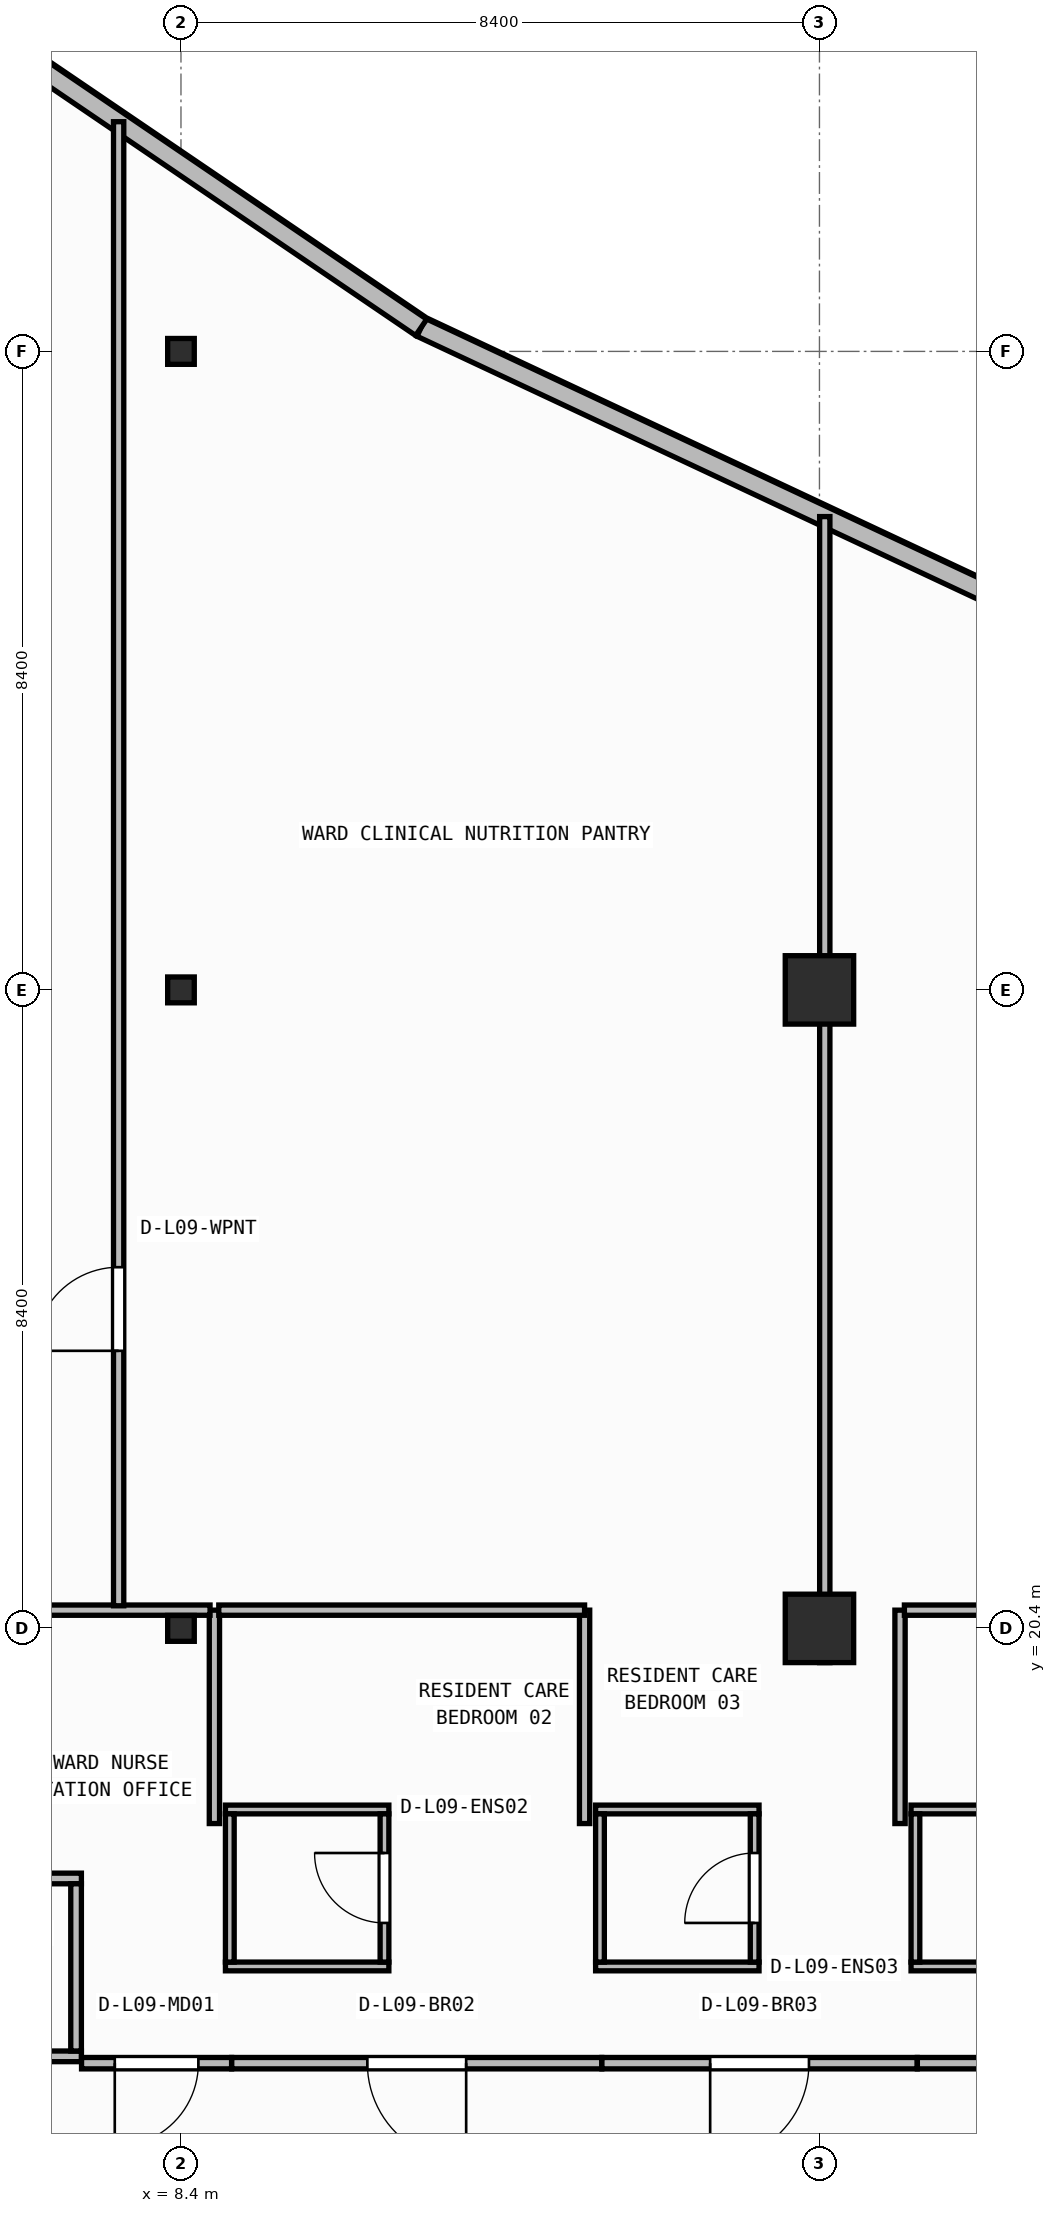
"""IFC4 building model, lengths in metres.
Left out: names, types, materials, properties, quantities, classifications, styles, units other than length and angle.
Written with IfcOpenShell. Run it as: python <this file> out.ifc"""

import sys

from ifc_helpers import new_model, si_unit, direction, frame, frame_2d, origin, origin_2d, place, context, subcontext, project, spatial, rectangle, i_section, extrude, element, fill, save


model = new_model("IFC4")
c1 = context("Model", 3, precision=1e-05, world=origin(), true_north=direction((0.0, 1.0)))
c2 = subcontext(c1, "Body", "Model", "MODEL_VIEW")
j1 = project(units=[si_unit("LENGTHUNIT", "METRE"), si_unit("PLANEANGLEUNIT", "RADIAN")], contexts=[c1])
p1 = place(None, origin())
s1 = spatial("IfcSite", under=j1, at=p1, CompositionType="ELEMENT")
p2 = place(p1, origin())
s2 = spatial("IfcBuilding", under=s1, at=p2, CompositionType="ELEMENT")
p3 = place(p2, frame((0.0, 0.0, 38.3)))
s3 = spatial("IfcBuildingStorey", under=s2, at=p3, CompositionType="ELEMENT", Elevation=38.3)
p4 = place(p3, frame((8.4, 20.4, 0.0), z_axis=(0.0, 0.0, 1.0), x_axis=(1.0, 0.0, 0.0)))
e1 = element("IfcColumn", 1, at=p4, inside=s3, PredefinedType="COLUMN", context=c2, shape_type="SweptSolid", body=[
    extrude(i_section(OverallWidth=0.35, OverallDepth=0.34, WebThickness=0.016, FlangeThickness=0.028, at=origin_2d()), origin(), (0.0, 0.0, 1.0), 3.95),
])
p5 = place(p3, frame((16.8, 20.4, 0.0), z_axis=(0.0, 0.0, 1.0), x_axis=(1.0, 0.0, 0.0)))
e2 = element("IfcColumn", 2, at=p5, inside=s3, PredefinedType="COLUMN", context=c2, shape_type="SweptSolid", body=[
    extrude(rectangle(XDim=0.9, YDim=0.9, at=origin_2d()), origin(), (0.0, 0.0, 1.0), 3.95),
])
p6 = place(p3, frame((8.4, 28.8, 0.0), z_axis=(0.0, 0.0, 1.0), x_axis=(1.0, 0.0, 0.0)))
e3 = element("IfcColumn", 3, at=p6, inside=s3, PredefinedType="COLUMN", context=c2, shape_type="SweptSolid", body=[
    extrude(i_section(OverallWidth=0.35, OverallDepth=0.34, WebThickness=0.016, FlangeThickness=0.028, at=origin_2d()), origin(), (0.0, 0.0, 1.0), 3.95),
])
p7 = place(p3, frame((16.8, 28.8, 0.0), z_axis=(0.0, 0.0, 1.0), x_axis=(1.0, 0.0, 0.0)))
e4 = element("IfcColumn", 4, at=p7, inside=s3, PredefinedType="COLUMN", context=c2, shape_type="SweptSolid", body=[
    extrude(rectangle(XDim=0.9, YDim=0.9, at=origin_2d()), origin(), (0.0, 0.0, 1.0), 3.95),
])
p8 = place(p3, frame((8.4, 37.2, 0.0), z_axis=(0.0, 0.0, 1.0), x_axis=(1.0, 0.0, 0.0)))
e5 = element("IfcColumn", 5, at=p8, inside=s3, PredefinedType="COLUMN", context=c2, shape_type="SweptSolid", body=[
    extrude(i_section(OverallWidth=0.35, OverallDepth=0.34, WebThickness=0.016, FlangeThickness=0.028, at=origin_2d()), origin(), (0.0, 0.0, 1.0), 3.95),
])
p9 = place(p3, frame((24.408, 31.492, 0.0), z_axis=(0.0, 0.0, 1.0), x_axis=(-0.905396522918, 0.424566998585, 0.0)))
e6 = element("IfcWall", 6, at=p9, inside=s3, PredefinedType="STANDARD", context=c2, shape_type="SweptSolid", body=[
    extrude(rectangle(XDim=14.189, YDim=0.26, at=frame_2d((7.095, 0.0))), origin(), (0.0, 0.0, 1.0), 3.71),
])
p10 = place(p9, frame((2.953, 0.0, 0.9)))
e7 = element("IfcOpeningElement", 7, at=p10, cuts=e6, PredefinedType="OPENING", context=c2, shape_type="SweptSolid", body=[
    extrude(rectangle(XDim=2.4, YDim=1.65, at=frame_2d((1.2, 0.825))), frame((0.0, 0.14, 0.0), z_axis=(0.0, -1.0, 0.0), x_axis=(1.0, 0.0, 0.0)), (0.0, 0.0, 1.0), 0.28),
])
p11 = place(p3, frame((11.561, 37.517, 0.0), z_axis=(0.0, 0.0, 1.0), x_axis=(-0.827064743936, 0.562106670782, 0.0)))
e8 = element("IfcWall", 8, at=p11, inside=s3, PredefinedType="STANDARD", context=c2, shape_type="SweptSolid", body=[
    extrude(rectangle(XDim=10.641, YDim=0.26, at=frame_2d((5.32, 0.0))), origin(), (0.0, 0.0, 1.0), 3.71),
])
p12 = place(p11, frame((6.537, 0.0, 0.9)))
e9 = element("IfcOpeningElement", 9, at=p12, cuts=e8, PredefinedType="OPENING", context=c2, shape_type="SweptSolid", body=[
    extrude(rectangle(XDim=2.4, YDim=1.65, at=frame_2d((1.2, 0.825))), frame((0.0, 0.14, 0.0), z_axis=(0.0, -1.0, 0.0), x_axis=(1.0, 0.0, 0.0)), (0.0, 0.0, 1.0), 0.28),
])
p13 = place(p3, frame((4.31, 14.77, 0.0), z_axis=(0.0, 0.0, 1.0), x_axis=(1.0, 0.0, 0.0)))
e10 = element("IfcWall", 10, at=p13, inside=s3, PredefinedType="PARTITIONING", context=c2, shape_type="SweptSolid", body=[
    extrude(rectangle(XDim=2.78, YDim=0.14, at=frame_2d((1.39, 0.0))), origin(), (0.0, 0.0, 1.0), 3.71),
])
p14 = place(p13, frame((0.9, 0.0, 0.0)))
e11 = element("IfcOpeningElement", 11, at=p14, cuts=e10, PredefinedType="OPENING", context=c2, shape_type="SweptSolid", body=[
    extrude(rectangle(XDim=0.98, YDim=2.1, at=frame_2d((0.49, 1.05))), frame((0.0, 0.08, 0.0), z_axis=(0.0, -1.0, 0.0), x_axis=(1.0, 0.0, 0.0)), (0.0, 0.0, 1.0), 0.16),
])
p15 = place(p3, frame((4.31, 17.11, 0.0), z_axis=(0.0, 0.0, 1.0), x_axis=(1.0, 0.0, 0.0)))
e12 = element("IfcWall", 12, at=p15, inside=s3, PredefinedType="PARTITIONING", context=c2, shape_type="SweptSolid", body=[
    extrude(rectangle(XDim=2.78, YDim=0.14, at=frame_2d((1.39, 0.0))), origin(), (0.0, 0.0, 1.0), 3.71),
])
p16 = place(p3, frame((7.02, 14.84, 0.0), z_axis=(0.0, 0.0, 1.0), x_axis=(0.0, 1.0, 0.0)))
e13 = element("IfcWall", 13, at=p16, inside=s3, PredefinedType="PARTITIONING", context=c2, shape_type="SweptSolid", body=[
    extrude(rectangle(XDim=2.2, YDim=0.14, at=frame_2d((1.1, 0.0))), origin(), (0.0, 0.0, 1.0), 3.71),
])
for number, where, z_axis, x_axis in (
    (14, (8.985, 15.952, 0.0), (0.0, 0.0, 1.0), (1.0, 0.0, 0.0)),
    (15, (8.985, 18.018, 0.0), (0.0, 0.0, 1.0), (1.0, 0.0, 0.0)),
):
    element("IfcWall", number, at=place(p3, frame(where, z_axis=z_axis, x_axis=x_axis)), inside=s3, PredefinedType="PARTITIONING", context=c2, shape_type="SweptSolid", body=[
        extrude(rectangle(XDim=2.15, YDim=0.115, at=frame_2d((1.075, 0.0))), origin(), (0.0, 0.0, 1.0), 3.71),
    ])
p17 = place(p3, frame((9.042, 16.01, 0.0), z_axis=(0.0, 0.0, 1.0), x_axis=(0.0, 1.0, 0.0)))
e16 = element("IfcWall", 16, at=p17, inside=s3, PredefinedType="PARTITIONING", context=c2, shape_type="SweptSolid", body=[
    extrude(rectangle(XDim=1.95, YDim=0.115, at=frame_2d((0.975, 0.0))), origin(), (0.0, 0.0, 1.0), 3.71),
])
p18 = place(p3, frame((11.077, 16.01, 0.0), z_axis=(0.0, 0.0, 1.0), x_axis=(0.0, 1.0, 0.0)))
e17 = element("IfcWall", 17, at=p18, inside=s3, PredefinedType="PARTITIONING", context=c2, shape_type="SweptSolid", body=[
    extrude(rectangle(XDim=1.95, YDim=0.115, at=frame_2d((0.975, 0.0))), origin(), (0.0, 0.0, 1.0), 3.71),
])
p19 = place(p18, frame((0.515, 0.0, 0.0)))
e18 = element("IfcOpeningElement", 18, at=p19, cuts=e17, PredefinedType="OPENING", context=c2, shape_type="SweptSolid", body=[
    extrude(rectangle(XDim=0.92, YDim=2.1, at=frame_2d((0.46, 1.05))), frame((0.0, 0.067, 0.0), z_axis=(0.0, -1.0, 0.0), x_axis=(1.0, 0.0, 0.0)), (0.0, 0.0, 1.0), 0.135),
])
for number, where, z_axis, x_axis in (
    (19, (13.855, 15.952, 0.0), (0.0, 0.0, 1.0), (1.0, 0.0, 0.0)),
    (20, (13.855, 18.018, 0.0), (0.0, 0.0, 1.0), (1.0, 0.0, 0.0)),
):
    element("IfcWall", number, at=place(p3, frame(where, z_axis=z_axis, x_axis=x_axis)), inside=s3, PredefinedType="PARTITIONING", context=c2, shape_type="SweptSolid", body=[
        extrude(rectangle(XDim=2.15, YDim=0.115, at=frame_2d((1.075, 0.0))), origin(), (0.0, 0.0, 1.0), 3.71),
    ])
p20 = place(p3, frame((13.913, 16.01, 0.0), z_axis=(0.0, 0.0, 1.0), x_axis=(0.0, 1.0, 0.0)))
e21 = element("IfcWall", 21, at=p20, inside=s3, PredefinedType="PARTITIONING", context=c2, shape_type="SweptSolid", body=[
    extrude(rectangle(XDim=1.95, YDim=0.115, at=frame_2d((0.975, 0.0))), origin(), (0.0, 0.0, 1.0), 3.71),
])
p21 = place(p3, frame((15.948, 16.01, 0.0), z_axis=(0.0, 0.0, 1.0), x_axis=(0.0, 1.0, 0.0)))
e22 = element("IfcWall", 22, at=p21, inside=s3, PredefinedType="PARTITIONING", context=c2, shape_type="SweptSolid", body=[
    extrude(rectangle(XDim=1.95, YDim=0.115, at=frame_2d((0.975, 0.0))), origin(), (0.0, 0.0, 1.0), 3.71),
])
p22 = place(p21, frame((0.515, 0.0, 0.0)))
e23 = element("IfcOpeningElement", 23, at=p22, cuts=e22, PredefinedType="OPENING", context=c2, shape_type="SweptSolid", body=[
    extrude(rectangle(XDim=0.92, YDim=2.1, at=frame_2d((0.46, 1.05))), frame((0.0, 0.067, 0.0), z_axis=(0.0, -1.0, 0.0), x_axis=(1.0, 0.0, 0.0)), (0.0, 0.0, 1.0), 0.135),
])
for number, where, z_axis, x_axis in (
    (24, (18.005, 15.952, 0.0), (0.0, 0.0, 1.0), (1.0, 0.0, 0.0)),
    (25, (18.005, 18.018, 0.0), (0.0, 0.0, 1.0), (1.0, 0.0, 0.0)),
):
    element("IfcWall", number, at=place(p3, frame(where, z_axis=z_axis, x_axis=x_axis)), inside=s3, PredefinedType="PARTITIONING", context=c2, shape_type="SweptSolid", body=[
        extrude(rectangle(XDim=2.15, YDim=0.115, at=frame_2d((1.075, 0.0))), origin(), (0.0, 0.0, 1.0), 3.71),
    ])
p23 = place(p3, frame((18.062, 16.01, 0.0), z_axis=(0.0, 0.0, 1.0), x_axis=(0.0, 1.0, 0.0)))
e26 = element("IfcWall", 26, at=p23, inside=s3, PredefinedType="PARTITIONING", context=c2, shape_type="SweptSolid", body=[
    extrude(rectangle(XDim=1.95, YDim=0.115, at=frame_2d((0.975, 0.0))), origin(), (0.0, 0.0, 1.0), 3.71),
])
p24 = place(p3, frame((9.066, 14.68, 0.0), z_axis=(0.0, 0.0, 1.0), x_axis=(-1.0, 0.0, 0.0)))
e27 = element("IfcWall", 27, at=p24, inside=s3, PredefinedType="PARTITIONING", context=c2, shape_type="SweptSolid", body=[
    extrude(rectangle(XDim=1.974, YDim=0.15, at=frame_2d((0.987, 0.0))), origin(), (0.0, 0.0, 1.0), 3.71),
])
p25 = place(p24, frame((0.437, 0.0, 0.0)))
e28 = element("IfcOpeningElement", 28, at=p25, cuts=e27, PredefinedType="OPENING", context=c2, shape_type="SweptSolid", body=[
    extrude(rectangle(XDim=1.1, YDim=2.1, at=frame_2d((0.55, 1.05))), frame((0.0, 0.085, 0.0), z_axis=(0.0, -1.0, 0.0), x_axis=(1.0, 0.0, 0.0)), (0.0, 0.0, 1.0), 0.17),
])
p26 = place(p3, frame((13.936, 14.68, 0.0), z_axis=(0.0, 0.0, 1.0), x_axis=(-1.0, 0.0, 0.0)))
e29 = element("IfcWall", 29, at=p26, inside=s3, PredefinedType="PARTITIONING", context=c2, shape_type="SweptSolid", body=[
    extrude(rectangle(XDim=4.868, YDim=0.15, at=frame_2d((2.434, 0.0))), origin(), (0.0, 0.0, 1.0), 3.71),
])
p27 = place(p26, frame((1.784, 0.0, 0.0)))
e30 = element("IfcOpeningElement", 30, at=p27, cuts=e29, PredefinedType="OPENING", context=c2, shape_type="SweptSolid", body=[
    extrude(rectangle(XDim=1.3, YDim=2.15, at=frame_2d((0.65, 1.075))), frame((0.0, 0.085, 0.0), z_axis=(0.0, -1.0, 0.0), x_axis=(1.0, 0.0, 0.0)), (0.0, 0.0, 1.0), 0.17),
])
p28 = place(p3, frame((18.086, 14.68, 0.0), z_axis=(0.0, 0.0, 1.0), x_axis=(-1.0, 0.0, 0.0)))
e31 = element("IfcWall", 31, at=p28, inside=s3, PredefinedType="PARTITIONING", context=c2, shape_type="SweptSolid", body=[
    extrude(rectangle(XDim=4.148, YDim=0.15, at=frame_2d((2.074, 0.0))), origin(), (0.0, 0.0, 1.0), 3.71),
])
p29 = place(p28, frame((1.424, 0.0, 0.0)))
e32 = element("IfcOpeningElement", 32, at=p29, cuts=e31, PredefinedType="OPENING", context=c2, shape_type="SweptSolid", body=[
    extrude(rectangle(XDim=1.3, YDim=2.15, at=frame_2d((0.65, 1.075))), frame((0.0, 0.085, 0.0), z_axis=(0.0, -1.0, 0.0), x_axis=(1.0, 0.0, 0.0)), (0.0, 0.0, 1.0), 0.17),
])
p30 = place(p3, frame((22.596, 14.68, 0.0), z_axis=(0.0, 0.0, 1.0), x_axis=(-1.0, 0.0, 0.0)))
e33 = element("IfcWall", 33, at=p30, inside=s3, PredefinedType="PARTITIONING", context=c2, shape_type="SweptSolid", body=[
    extrude(rectangle(XDim=4.508, YDim=0.15, at=frame_2d((2.254, 0.0))), origin(), (0.0, 0.0, 1.0), 3.71),
])
p31 = place(p30, frame((1.604, 0.0, 0.0)))
e34 = element("IfcOpeningElement", 34, at=p31, cuts=e33, PredefinedType="OPENING", context=c2, shape_type="SweptSolid", body=[
    extrude(rectangle(XDim=1.3, YDim=2.15, at=frame_2d((0.65, 1.075))), frame((0.0, 0.085, 0.0), z_axis=(0.0, -1.0, 0.0), x_axis=(1.0, 0.0, 0.0)), (0.0, 0.0, 1.0), 0.17),
])
p32 = place(p3, frame((8.84, 17.833, 0.0), z_axis=(0.0, 0.0, 1.0), x_axis=(0.0, 1.0, 0.0)))
e35 = element("IfcWall", 35, at=p32, inside=s3, PredefinedType="PARTITIONING", context=c2, shape_type="SweptSolid", body=[
    extrude(rectangle(XDim=2.807, YDim=0.135, at=frame_2d((1.404, 0.0))), origin(), (0.0, 0.0, 1.0), 3.71),
])
p33 = place(p3, frame((8.782, 20.64, 0.0), z_axis=(0.0, 0.0, 1.0), x_axis=(-1.0, 0.0, 0.0)))
e36 = element("IfcWall", 36, at=p33, inside=s3, PredefinedType="PARTITIONING", context=c2, shape_type="SweptSolid", body=[
    extrude(rectangle(XDim=4.395, YDim=0.135, at=frame_2d((2.198, 0.0))), origin(), (0.0, 0.0, 1.0), 3.073),
])
p34 = place(p33, frame((3.023, 0.0, 0.0)))
e37 = element("IfcOpeningElement", 37, at=p34, cuts=e36, PredefinedType="OPENING", context=c2, shape_type="SweptSolid", body=[
    extrude(rectangle(XDim=1.1, YDim=2.1, at=frame_2d((0.55, 1.05))), frame((0.0, 0.077, 0.0), z_axis=(0.0, -1.0, 0.0), x_axis=(1.0, 0.0, 0.0)), (0.0, 0.0, 1.0), 0.155),
])
p35 = place(p3, frame((13.71, 17.833, 0.0), z_axis=(0.0, 0.0, 1.0), x_axis=(0.0, 1.0, 0.0)))
e38 = element("IfcWall", 38, at=p35, inside=s3, PredefinedType="PARTITIONING", context=c2, shape_type="SweptSolid", body=[
    extrude(rectangle(XDim=2.807, YDim=0.135, at=frame_2d((1.404, 0.0))), origin(), (0.0, 0.0, 1.0), 3.71),
])
p36 = place(p3, frame((13.71, 20.64, 0.0), z_axis=(0.0, 0.0, 1.0), x_axis=(-1.0, 0.0, 0.0)))
e39 = element("IfcWall", 39, at=p36, inside=s3, PredefinedType="PARTITIONING", context=c2, shape_type="SweptSolid", body=[
    extrude(rectangle(XDim=4.812, YDim=0.135, at=frame_2d((2.406, 0.0))), origin(), (0.0, 0.0, 1.0), 3.073),
])
p37 = place(p3, frame((17.86, 17.833, 0.0), z_axis=(0.0, 0.0, 1.0), x_axis=(0.0, 1.0, 0.0)))
e40 = element("IfcWall", 40, at=p37, inside=s3, PredefinedType="PARTITIONING", context=c2, shape_type="SweptSolid", body=[
    extrude(rectangle(XDim=2.807, YDim=0.135, at=frame_2d((1.404, 0.0))), origin(), (0.0, 0.0, 1.0), 3.71),
])
p38 = place(p3, frame((22.37, 20.64, 0.0), z_axis=(0.0, 0.0, 1.0), x_axis=(-1.0, 0.0, 0.0)))
e41 = element("IfcWall", 41, at=p38, inside=s3, PredefinedType="PARTITIONING", context=c2, shape_type="SweptSolid", body=[
    extrude(rectangle(XDim=4.453, YDim=0.135, at=frame_2d((2.226, 0.0))), origin(), (0.0, 0.0, 1.0), 3.073),
])
p39 = place(p3, frame((7.58, 20.698, 0.0), z_axis=(0.0, 0.0, 1.0), x_axis=(0.0, 1.0, 0.0)))
e42 = element("IfcWall", 42, at=p39, inside=s3, PredefinedType="PARTITIONING", context=c2, shape_type="SweptSolid", body=[
    extrude(rectangle(XDim=19.524, YDim=0.135, at=frame_2d((9.762, 0.0))), origin(), (0.0, 0.0, 1.0), 3.71),
])
p40 = place(p39, frame((3.354, 0.0, 0.0)))
e43 = element("IfcOpeningElement", 43, at=p40, cuts=e42, PredefinedType="OPENING", context=c2, shape_type="SweptSolid", body=[
    extrude(rectangle(XDim=1.1, YDim=2.1, at=frame_2d((0.55, 1.05))), frame((0.0, 0.077, 0.0), z_axis=(0.0, -1.0, 0.0), x_axis=(1.0, 0.0, 0.0)), (0.0, 0.0, 1.0), 0.155),
])
p41 = place(p3, frame((16.87, 19.95, 0.0), z_axis=(0.0, 0.0, 1.0), x_axis=(0.0, 1.0, 0.0)))
e44 = element("IfcWall", 44, at=p41, inside=s3, PredefinedType="PARTITIONING", context=c2, shape_type="SweptSolid", body=[
    extrude(rectangle(XDim=15.077, YDim=0.135, at=frame_2d((7.539, 0.0))), origin(), (0.0, 0.0, 1.0), 3.073),
])
p42 = place(p19, origin())
e45 = element("IfcDoor", 45, at=p42, inside=s3, OperationType="SINGLE_SWING_RIGHT", PredefinedType="DOOR", context=c2, shape_type="SweptSolid", body=[
    extrude(rectangle(XDim=0.92, YDim=2.1, at=frame_2d((0.46, 1.05))), frame((0.0, 0.025, 0.0), z_axis=(0.0, -1.0, 0.0), x_axis=(1.0, 0.0, 0.0)), (0.0, 0.0, 1.0), 0.05),
])
fill(e18, e45)
p43 = place(p22, origin())
e46 = element("IfcDoor", 46, at=p43, inside=s3, OperationType="SINGLE_SWING_LEFT", PredefinedType="DOOR", context=c2, shape_type="SweptSolid", body=[
    extrude(rectangle(XDim=0.92, YDim=2.1, at=frame_2d((0.46, 1.05))), frame((0.0, 0.025, 0.0), z_axis=(0.0, -1.0, 0.0), x_axis=(1.0, 0.0, 0.0)), (0.0, 0.0, 1.0), 0.05),
])
fill(e23, e46)
p44 = place(p25, origin())
e47 = element("IfcDoor", 47, at=p44, inside=s3, OperationType="SINGLE_SWING_RIGHT", PredefinedType="DOOR", context=c2, shape_type="SweptSolid", body=[
    extrude(rectangle(XDim=1.1, YDim=2.1, at=frame_2d((0.55, 1.05))), frame((0.0, 0.025, 0.0), z_axis=(0.0, -1.0, 0.0), x_axis=(1.0, 0.0, 0.0)), (0.0, 0.0, 1.0), 0.05),
])
fill(e28, e47)
p45 = place(p27, origin())
e48 = element("IfcDoor", 48, at=p45, inside=s3, OperationType="SINGLE_SWING_LEFT", PredefinedType="DOOR", context=c2, shape_type="SweptSolid", body=[
    extrude(rectangle(XDim=1.3, YDim=2.15, at=frame_2d((0.65, 1.075))), frame((0.0, 0.025, 0.0), z_axis=(0.0, -1.0, 0.0), x_axis=(1.0, 0.0, 0.0)), (0.0, 0.0, 1.0), 0.05),
])
fill(e30, e48)
p46 = place(p29, origin())
e49 = element("IfcDoor", 49, at=p46, inside=s3, OperationType="SINGLE_SWING_RIGHT", PredefinedType="DOOR", context=c2, shape_type="SweptSolid", body=[
    extrude(rectangle(XDim=1.3, YDim=2.15, at=frame_2d((0.65, 1.075))), frame((0.0, 0.025, 0.0), z_axis=(0.0, -1.0, 0.0), x_axis=(1.0, 0.0, 0.0)), (0.0, 0.0, 1.0), 0.05),
])
fill(e32, e49)
p47 = place(p40, origin())
e50 = element("IfcDoor", 50, at=p47, inside=s3, OperationType="SINGLE_SWING_LEFT", PredefinedType="DOOR", context=c2, shape_type="SweptSolid", body=[
    extrude(rectangle(XDim=1.1, YDim=2.1, at=frame_2d((0.55, 1.05))), frame((0.0, 0.025, 0.0), z_axis=(0.0, -1.0, 0.0), x_axis=(1.0, 0.0, 0.0)), (0.0, 0.0, 1.0), 0.05),
])
fill(e43, e50)
save(model, sys.argv[1])
